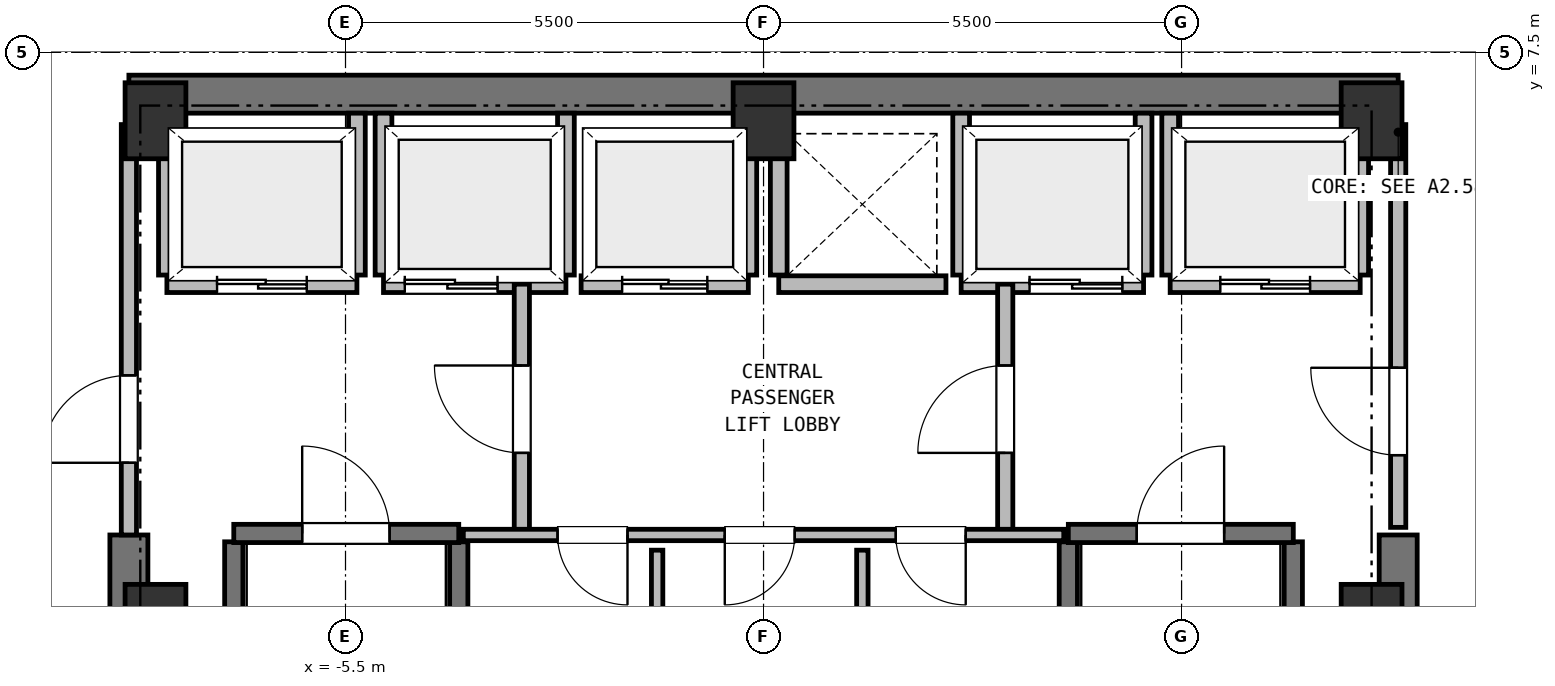
"""IFC4 building model, lengths in metres.
Left out: names, types, materials, properties, quantities, classifications, styles, units other than length and angle.
Written with IfcOpenShell. Run it as: python <this file> out.ifc"""

import sys

from ifc_helpers import new_model, si_unit, direction, frame, frame_2d, origin, origin_2d, place, context, subcontext, project, spatial, rectangle, extrude, element, fill, save


model = new_model("IFC4")
c1 = context("Model", 3, precision=1e-05, world=origin(), true_north=direction((0.0, 1.0)))
c2 = subcontext(c1, "Body", "Model", "MODEL_VIEW")
j1 = project(units=[si_unit("LENGTHUNIT", "METRE"), si_unit("PLANEANGLEUNIT", "RADIAN")], contexts=[c1])
p1 = place(None, origin())
s1 = spatial("IfcSite", under=j1, at=p1, CompositionType="ELEMENT")
p2 = place(p1, origin())
s2 = spatial("IfcBuilding", under=s1, at=p2, CompositionType="ELEMENT")
p3 = place(p2, frame((0.0, 0.0, 216.95)))
s3 = spatial("IfcBuildingStorey", under=s2, at=p3, CompositionType="ELEMENT", Elevation=216.95)
for number, where, z_axis, x_axis in (
    (1, (8.0, 0.0, 0.0), (0.0, 0.0, 1.0), (1.0, 0.0, 0.0)),
    (2, (8.0, 6.6, 0.0), (0.0, 0.0, 1.0), (1.0, 0.0, 0.0)),
    (3, (0.0, 6.6, 0.0), (0.0, 0.0, 1.0), (1.0, 0.0, 0.0)),
    (4, (-8.0, 6.6, 0.0), (0.0, 0.0, 1.0), (1.0, 0.0, 0.0)),
    (5, (-8.0, 0.0, 0.0), (0.0, 0.0, 1.0), (1.0, 0.0, 0.0)),
):
    element("IfcColumn", number, at=place(p3, frame(where, z_axis=z_axis, x_axis=x_axis)), inside=s3, PredefinedType="COLUMN", context=c2, shape_type="SweptSolid", body=[
        extrude(rectangle(XDim=0.8, YDim=1.0, at=origin_2d()), origin(), (0.0, 0.0, 1.0), 3.8),
    ])
p4 = place(p3, frame((-8.35, 6.95, 0.0), z_axis=(0.0, 0.0, 1.0), x_axis=(1.0, 0.0, 0.0)))
e6 = element("IfcWall", 6, at=p4, inside=s3, PredefinedType="SHEAR", context=c2, shape_type="SweptSolid", body=[
    extrude(rectangle(XDim=16.7, YDim=0.5, at=frame_2d((8.35, 0.0))), origin(), (0.0, 0.0, 1.0), 3.55),
])
for number, where, z_axis, x_axis in (
    (7, (-8.35, -6.95, 0.0), (0.0, 0.0, 1.0), (0.0, 1.0, 0.0)),
    (8, (8.35, -6.95, 0.0), (0.0, 0.0, 1.0), (0.0, 1.0, 0.0)),
):
    element("IfcWall", number, at=place(p3, frame(where, z_axis=z_axis, x_axis=x_axis)), inside=s3, PredefinedType="SHEAR", context=c2, shape_type="SweptSolid", body=[
        extrude(rectangle(XDim=8.1, YDim=0.5, at=frame_2d((4.05, 0.0))), origin(), (0.0, 0.0, 1.0), 3.55),
    ])
for number, where, z_axis, x_axis in (
    (9, (-6.97, -6.16, 0.0), (0.0, 0.0, 1.0), (0.0, 1.0, 0.0)),
    (10, (-4.01, -6.16, 0.0), (0.0, 0.0, 1.0), (0.0, 1.0, 0.0)),
):
    element("IfcWall", number, at=place(p3, frame(where, z_axis=z_axis, x_axis=x_axis)), inside=s3, PredefinedType="SHEAR", context=c2, shape_type="SweptSolid", body=[
        extrude(rectangle(XDim=7.22, YDim=0.24, at=frame_2d((3.61, 0.0))), origin(), (0.0, 0.0, 1.0), 3.55),
    ])
p5 = place(p3, frame((-6.97, 1.17, 0.0), z_axis=(0.0, 0.0, 1.0), x_axis=(1.0, 0.0, 0.0)))
e11 = element("IfcWall", 11, at=p5, inside=s3, PredefinedType="SHEAR", context=c2, shape_type="SweptSolid", body=[
    extrude(rectangle(XDim=2.96, YDim=0.24, at=frame_2d((1.48, 0.0))), origin(), (0.0, 0.0, 1.0), 3.55),
])
p6 = place(p5, frame((0.9, 0.0, 0.0)))
e12 = element("IfcOpeningElement", 12, at=p6, cuts=e11, PredefinedType="OPENING", context=c2, shape_type="SweptSolid", body=[
    extrude(rectangle(XDim=1.15, YDim=2.15, at=frame_2d((0.575, 1.075))), frame((0.0, 0.13, 0.0), z_axis=(0.0, -1.0, 0.0), x_axis=(1.0, 0.0, 0.0)), (0.0, 0.0, 1.0), 0.26),
])
for number, where, z_axis, x_axis in (
    (13, (4.01, -6.16, 0.0), (0.0, 0.0, 1.0), (0.0, 1.0, 0.0)),
    (14, (6.97, -6.16, 0.0), (0.0, 0.0, 1.0), (0.0, 1.0, 0.0)),
):
    element("IfcWall", number, at=place(p3, frame(where, z_axis=z_axis, x_axis=x_axis)), inside=s3, PredefinedType="SHEAR", context=c2, shape_type="SweptSolid", body=[
        extrude(rectangle(XDim=7.22, YDim=0.24, at=frame_2d((3.61, 0.0))), origin(), (0.0, 0.0, 1.0), 3.55),
    ])
p7 = place(p3, frame((4.01, 1.17, 0.0), z_axis=(0.0, 0.0, 1.0), x_axis=(1.0, 0.0, 0.0)))
e15 = element("IfcWall", 15, at=p7, inside=s3, PredefinedType="SHEAR", context=c2, shape_type="SweptSolid", body=[
    extrude(rectangle(XDim=2.96, YDim=0.24, at=frame_2d((1.48, 0.0))), origin(), (0.0, 0.0, 1.0), 3.55),
])
p8 = place(p7, frame((0.9, 0.0, 0.0)))
e16 = element("IfcOpeningElement", 16, at=p8, cuts=e15, PredefinedType="OPENING", context=c2, shape_type="SweptSolid", body=[
    extrude(rectangle(XDim=1.15, YDim=2.15, at=frame_2d((0.575, 1.075))), frame((0.0, 0.13, 0.0), z_axis=(0.0, -1.0, 0.0), x_axis=(1.0, 0.0, 0.0)), (0.0, 0.0, 1.0), 0.26),
])
p9 = place(p3, frame((-7.85, 4.45, 0.0), z_axis=(0.0, 0.0, 1.0), x_axis=(1.0, 0.0, 0.0)))
e17 = element("IfcWall", 17, at=p9, inside=s3, PredefinedType="PARTITIONING", context=c2, shape_type="SweptSolid", body=[
    extrude(rectangle(XDim=2.5, YDim=0.22, at=frame_2d((1.25, 0.0))), origin(), (0.0, 0.0, 1.0), 3.55),
])
p10 = place(p9, frame((0.66, 0.0, 0.0)))
e18 = element("IfcOpeningElement", 18, at=p10, cuts=e17, PredefinedType="OPENING", context=c2, shape_type="SweptSolid", body=[
    extrude(rectangle(XDim=1.18, YDim=2.15, at=frame_2d((0.59, 1.075))), frame((0.0, 0.12, 0.0), z_axis=(0.0, -1.0, 0.0), x_axis=(1.0, 0.0, 0.0)), (0.0, 0.0, 1.0), 0.24),
])
p11 = place(p3, frame((-7.85, 4.57, 0.0), z_axis=(0.0, 0.0, 1.0), x_axis=(0.0, 1.0, 0.0)))
e19 = element("IfcWall", 19, at=p11, inside=s3, PredefinedType="PARTITIONING", context=c2, shape_type="SweptSolid", body=[
    extrude(rectangle(XDim=2.13, YDim=0.22, at=frame_2d((1.065, 0.0))), origin(), (0.0, 0.0, 1.0), 3.18),
])
p12 = place(p3, frame((-5.35, 4.57, 0.0), z_axis=(0.0, 0.0, 1.0), x_axis=(0.0, 1.0, 0.0)))
e20 = element("IfcWall", 20, at=p12, inside=s3, PredefinedType="PARTITIONING", context=c2, shape_type="SweptSolid", body=[
    extrude(rectangle(XDim=2.13, YDim=0.22, at=frame_2d((1.065, 0.0))), origin(), (0.0, 0.0, 1.0), 3.55),
])
p13 = place(p3, frame((5.35, 4.45, 0.0), z_axis=(0.0, 0.0, 1.0), x_axis=(1.0, 0.0, 0.0)))
e21 = element("IfcWall", 21, at=p13, inside=s3, PredefinedType="PARTITIONING", context=c2, shape_type="SweptSolid", body=[
    extrude(rectangle(XDim=2.5, YDim=0.22, at=frame_2d((1.25, 0.0))), origin(), (0.0, 0.0, 1.0), 3.55),
])
p14 = place(p13, frame((0.66, 0.0, 0.0)))
e22 = element("IfcOpeningElement", 22, at=p14, cuts=e21, PredefinedType="OPENING", context=c2, shape_type="SweptSolid", body=[
    extrude(rectangle(XDim=1.18, YDim=2.15, at=frame_2d((0.59, 1.075))), frame((0.0, 0.12, 0.0), z_axis=(0.0, -1.0, 0.0), x_axis=(1.0, 0.0, 0.0)), (0.0, 0.0, 1.0), 0.24),
])
p15 = place(p3, frame((5.35, 4.57, 0.0), z_axis=(0.0, 0.0, 1.0), x_axis=(0.0, 1.0, 0.0)))
e23 = element("IfcWall", 23, at=p15, inside=s3, PredefinedType="PARTITIONING", context=c2, shape_type="SweptSolid", body=[
    extrude(rectangle(XDim=2.13, YDim=0.22, at=frame_2d((1.065, 0.0))), origin(), (0.0, 0.0, 1.0), 3.55),
])
p16 = place(p3, frame((7.85, 4.57, 0.0), z_axis=(0.0, 0.0, 1.0), x_axis=(0.0, 1.0, 0.0)))
e24 = element("IfcWall", 24, at=p16, inside=s3, PredefinedType="PARTITIONING", context=c2, shape_type="SweptSolid", body=[
    extrude(rectangle(XDim=2.13, YDim=0.22, at=frame_2d((1.065, 0.0))), origin(), (0.0, 0.0, 1.0), 3.18),
])
p17 = place(p3, frame((-5.0, 4.45, 0.0), z_axis=(0.0, 0.0, 1.0), x_axis=(1.0, 0.0, 0.0)))
e25 = element("IfcWall", 25, at=p17, inside=s3, PredefinedType="PARTITIONING", context=c2, shape_type="SweptSolid", body=[
    extrude(rectangle(XDim=2.4, YDim=0.22, at=frame_2d((1.2, 0.0))), origin(), (0.0, 0.0, 1.0), 3.55),
])
p18 = place(p17, frame((0.28, 0.0, 0.0)))
e26 = element("IfcOpeningElement", 26, at=p18, cuts=e25, PredefinedType="OPENING", context=c2, shape_type="SweptSolid", body=[
    extrude(rectangle(XDim=1.22, YDim=2.15, at=frame_2d((0.61, 1.075))), frame((0.0, 0.12, 0.0), z_axis=(0.0, -1.0, 0.0), x_axis=(1.0, 0.0, 0.0)), (0.0, 0.0, 1.0), 0.24),
])
for number, where, z_axis, x_axis in (
    (27, (-5.0, 4.57, 0.0), (0.0, 0.0, 1.0), (0.0, 1.0, 0.0)),
    (28, (-2.6, 4.57, 0.0), (0.0, 0.0, 1.0), (0.0, 1.0, 0.0)),
):
    element("IfcWall", number, at=place(p3, frame(where, z_axis=z_axis, x_axis=x_axis)), inside=s3, PredefinedType="PARTITIONING", context=c2, shape_type="SweptSolid", body=[
        extrude(rectangle(XDim=2.13, YDim=0.22, at=frame_2d((1.065, 0.0))), origin(), (0.0, 0.0, 1.0), 3.55),
    ])
p19 = place(p3, frame((2.6, 4.45, 0.0), z_axis=(0.0, 0.0, 1.0), x_axis=(1.0, 0.0, 0.0)))
e29 = element("IfcWall", 29, at=p19, inside=s3, PredefinedType="PARTITIONING", context=c2, shape_type="SweptSolid", body=[
    extrude(rectangle(XDim=2.4, YDim=0.22, at=frame_2d((1.2, 0.0))), origin(), (0.0, 0.0, 1.0), 3.55),
])
p20 = place(p19, frame((0.9, 0.0, 0.0)))
e30 = element("IfcOpeningElement", 30, at=p20, cuts=e29, PredefinedType="OPENING", context=c2, shape_type="SweptSolid", body=[
    extrude(rectangle(XDim=1.22, YDim=2.15, at=frame_2d((0.61, 1.075))), frame((0.0, 0.12, 0.0), z_axis=(0.0, -1.0, 0.0), x_axis=(1.0, 0.0, 0.0)), (0.0, 0.0, 1.0), 0.24),
])
for number, where, z_axis, x_axis in (
    (31, (2.6, 4.57, 0.0), (0.0, 0.0, 1.0), (0.0, 1.0, 0.0)),
    (32, (5.0, 4.57, 0.0), (0.0, 0.0, 1.0), (0.0, 1.0, 0.0)),
):
    element("IfcWall", number, at=place(p3, frame(where, z_axis=z_axis, x_axis=x_axis)), inside=s3, PredefinedType="PARTITIONING", context=c2, shape_type="SweptSolid", body=[
        extrude(rectangle(XDim=2.13, YDim=0.22, at=frame_2d((1.065, 0.0))), origin(), (0.0, 0.0, 1.0), 3.55),
    ])
p21 = place(p3, frame((-2.4, 4.45, 0.0), z_axis=(0.0, 0.0, 1.0), x_axis=(1.0, 0.0, 0.0)))
e33 = element("IfcWall", 33, at=p21, inside=s3, PredefinedType="PARTITIONING", context=c2, shape_type="SweptSolid", body=[
    extrude(rectangle(XDim=2.2, YDim=0.22, at=frame_2d((1.1, 0.0))), origin(), (0.0, 0.0, 1.0), 3.55),
])
p22 = place(p21, frame((0.54, 0.0, 0.0)))
e34 = element("IfcOpeningElement", 34, at=p22, cuts=e33, PredefinedType="OPENING", context=c2, shape_type="SweptSolid", body=[
    extrude(rectangle(XDim=1.12, YDim=2.15, at=frame_2d((0.56, 1.075))), frame((0.0, 0.12, 0.0), z_axis=(0.0, -1.0, 0.0), x_axis=(1.0, 0.0, 0.0)), (0.0, 0.0, 1.0), 0.24),
])
p23 = place(p3, frame((-0.2, 4.57, 0.0), z_axis=(0.0, 0.0, 1.0), x_axis=(0.0, 1.0, 0.0)))
e35 = element("IfcWall", 35, at=p23, inside=s3, PredefinedType="PARTITIONING", context=c2, shape_type="SweptSolid", body=[
    extrude(rectangle(XDim=2.13, YDim=0.22, at=frame_2d((1.065, 0.0))), origin(), (0.0, 0.0, 1.0), 3.55),
])
p24 = place(p3, frame((0.2, 4.45, 0.0), z_axis=(0.0, 0.0, 1.0), x_axis=(1.0, 0.0, 0.0)))
e36 = element("IfcWall", 36, at=p24, inside=s3, PredefinedType="PARTITIONING", context=c2, shape_type="SweptSolid", body=[
    extrude(rectangle(XDim=2.2, YDim=0.22, at=frame_2d((1.1, 0.0))), origin(), (0.0, 0.0, 1.0), 3.55),
])
p25 = place(p3, frame((0.2, 4.57, 0.0), z_axis=(0.0, 0.0, 1.0), x_axis=(0.0, 1.0, 0.0)))
e37 = element("IfcWall", 37, at=p25, inside=s3, PredefinedType="PARTITIONING", context=c2, shape_type="SweptSolid", body=[
    extrude(rectangle(XDim=2.13, YDim=0.22, at=frame_2d((1.065, 0.0))), origin(), (0.0, 0.0, 1.0), 3.55),
])
p26 = place(p3, frame((-3.18, 1.15, 0.0), z_axis=(0.0, 0.0, 1.0), x_axis=(0.0, 1.0, 0.0)))
e38 = element("IfcWall", 38, at=p26, inside=s3, PredefinedType="PARTITIONING", context=c2, shape_type="SweptSolid", body=[
    extrude(rectangle(XDim=3.3, YDim=0.2, at=frame_2d((1.65, 0.0))), origin(), (0.0, 0.0, 1.0), 3.55),
])
p27 = place(p26, frame((1.08, 0.0, 0.0)))
e39 = element("IfcOpeningElement", 39, at=p27, cuts=e38, PredefinedType="OPENING", context=c2, shape_type="SweptSolid", body=[
    extrude(rectangle(XDim=1.15, YDim=2.15, at=frame_2d((0.575, 1.075))), frame((0.0, 0.11, 0.0), z_axis=(0.0, -1.0, 0.0), x_axis=(1.0, 0.0, 0.0)), (0.0, 0.0, 1.0), 0.22),
])
p28 = place(p3, frame((3.18, 1.15, 0.0), z_axis=(0.0, 0.0, 1.0), x_axis=(0.0, 1.0, 0.0)))
e40 = element("IfcWall", 40, at=p28, inside=s3, PredefinedType="PARTITIONING", context=c2, shape_type="SweptSolid", body=[
    extrude(rectangle(XDim=3.3, YDim=0.2, at=frame_2d((1.65, 0.0))), origin(), (0.0, 0.0, 1.0), 3.55),
])
p29 = place(p28, frame((1.08, 0.0, 0.0)))
e41 = element("IfcOpeningElement", 41, at=p29, cuts=e40, PredefinedType="OPENING", context=c2, shape_type="SweptSolid", body=[
    extrude(rectangle(XDim=1.15, YDim=2.15, at=frame_2d((0.575, 1.075))), frame((0.0, 0.11, 0.0), z_axis=(0.0, -1.0, 0.0), x_axis=(1.0, 0.0, 0.0)), (0.0, 0.0, 1.0), 0.22),
])
p30 = place(p3, frame((-8.35, 1.15, 0.0), z_axis=(0.0, 0.0, 1.0), x_axis=(0.0, 1.0, 0.0)))
e42 = element("IfcWall", 42, at=p30, inside=s3, PredefinedType="PARTITIONING", context=c2, shape_type="SweptSolid", body=[
    extrude(rectangle(XDim=5.4, YDim=0.2, at=frame_2d((2.7, 0.0))), origin(), (0.0, 0.0, 1.0), 3.55),
])
p31 = place(p30, frame((0.95, 0.0, 0.0)))
e43 = element("IfcOpeningElement", 43, at=p31, cuts=e42, PredefinedType="OPENING", context=c2, shape_type="SweptSolid", body=[
    extrude(rectangle(XDim=1.15, YDim=2.15, at=frame_2d((0.575, 1.075))), frame((0.0, 0.11, 0.0), z_axis=(0.0, -1.0, 0.0), x_axis=(1.0, 0.0, 0.0)), (0.0, 0.0, 1.0), 0.22),
])
p32 = place(p3, frame((8.35, 1.25, 0.0), z_axis=(0.0, 0.0, 1.0), x_axis=(0.0, 1.0, 0.0)))
e44 = element("IfcWall", 44, at=p32, inside=s3, PredefinedType="PARTITIONING", context=c2, shape_type="SweptSolid", body=[
    extrude(rectangle(XDim=5.3, YDim=0.2, at=frame_2d((2.65, 0.0))), origin(), (0.0, 0.0, 1.0), 3.55),
])
p33 = place(p32, frame((0.95, 0.0, 0.0)))
e45 = element("IfcOpeningElement", 45, at=p33, cuts=e44, PredefinedType="OPENING", context=c2, shape_type="SweptSolid", body=[
    extrude(rectangle(XDim=1.15, YDim=2.15, at=frame_2d((0.575, 1.075))), frame((0.0, 0.11, 0.0), z_axis=(0.0, -1.0, 0.0), x_axis=(1.0, 0.0, 0.0)), (0.0, 0.0, 1.0), 0.22),
])
p34 = place(p3, frame((3.95, 1.15, 0.0), z_axis=(0.0, 0.0, 1.0), x_axis=(-1.0, 0.0, 0.0)))
e46 = element("IfcWall", 46, at=p34, inside=s3, PredefinedType="PARTITIONING", context=c2, shape_type="SweptSolid", body=[
    extrude(rectangle(XDim=7.9, YDim=0.15, at=frame_2d((3.95, 0.0))), origin(), (0.0, 0.0, 1.0), 3.55),
])
p35 = place(p34, frame((5.74, 0.0, 0.0)))
e47 = element("IfcOpeningElement", 47, at=p35, cuts=e46, PredefinedType="OPENING", context=c2, shape_type="SweptSolid", body=[
    extrude(rectangle(XDim=0.92, YDim=2.05, at=frame_2d((0.46, 1.025))), frame((0.0, 0.085, 0.0), z_axis=(0.0, -1.0, 0.0), x_axis=(1.0, 0.0, 0.0)), (0.0, 0.0, 1.0), 0.17),
])
p36 = place(p34, frame((3.54, 0.0, 0.0)))
e48 = element("IfcOpeningElement", 48, at=p36, cuts=e46, PredefinedType="OPENING", context=c2, shape_type="SweptSolid", body=[
    extrude(rectangle(XDim=0.92, YDim=2.05, at=frame_2d((0.46, 1.025))), frame((0.0, 0.085, 0.0), z_axis=(0.0, -1.0, 0.0), x_axis=(1.0, 0.0, 0.0)), (0.0, 0.0, 1.0), 0.17),
])
p37 = place(p34, frame((1.29, 0.0, 0.0)))
e49 = element("IfcOpeningElement", 49, at=p37, cuts=e46, PredefinedType="OPENING", context=c2, shape_type="SweptSolid", body=[
    extrude(rectangle(XDim=0.92, YDim=2.05, at=frame_2d((0.46, 1.025))), frame((0.0, 0.085, 0.0), z_axis=(0.0, -1.0, 0.0), x_axis=(1.0, 0.0, 0.0)), (0.0, 0.0, 1.0), 0.17),
])
for number, where, z_axis, x_axis in (
    (50, (-1.4, -6.58, 0.0), (0.0, 0.0, 1.0), (0.0, 1.0, 0.0)),
    (51, (1.3, -6.58, 0.0), (0.0, 0.0, 1.0), (0.0, 1.0, 0.0)),
):
    element("IfcWall", number, at=place(p3, frame(where, z_axis=z_axis, x_axis=x_axis)), inside=s3, PredefinedType="PARTITIONING", context=c2, shape_type="SweptSolid", body=[
        extrude(rectangle(XDim=7.53, YDim=0.15, at=frame_2d((3.765, 0.0))), origin(), (0.0, 0.0, 1.0), 3.55),
    ])
for number, where, z_axis, x_axis in (
    (52, (8.648, 9.171, 0.0), (0.0, 0.0, 1.0), (0.69, -0.724, 0.0)),
    (53, (-10.422, 7.309, 0.0), (0.0, 0.0, 1.0), (0.69, 0.724, 0.0)),
):
    element("IfcWall", number, at=place(p3, frame(where, z_axis=z_axis, x_axis=x_axis)), inside=s3, PredefinedType="PARTITIONING", context=c2, shape_type="SweptSolid", body=[
        extrude(rectangle(XDim=2.572, YDim=0.15, at=frame_2d((1.286, 0.0))), origin(), (0.0, 0.0, 1.0), 3.55),
    ])
p38 = place(p6, origin())
e54 = element("IfcDoor", 54, at=p38, inside=s3, OperationType="SINGLE_SWING_LEFT", PredefinedType="DOOR", context=c2, shape_type="SweptSolid", body=[
    extrude(rectangle(XDim=1.15, YDim=2.15, at=frame_2d((0.575, 1.075))), frame((0.0, 0.025, 0.0), z_axis=(0.0, -1.0, 0.0), x_axis=(1.0, 0.0, 0.0)), (0.0, 0.0, 1.0), 0.05),
])
fill(e12, e54)
p39 = place(p8, origin())
e55 = element("IfcDoor", 55, at=p39, inside=s3, OperationType="SINGLE_SWING_RIGHT", PredefinedType="DOOR", context=c2, shape_type="SweptSolid", body=[
    extrude(rectangle(XDim=1.15, YDim=2.15, at=frame_2d((0.575, 1.075))), frame((0.0, 0.025, 0.0), z_axis=(0.0, -1.0, 0.0), x_axis=(1.0, 0.0, 0.0)), (0.0, 0.0, 1.0), 0.05),
])
fill(e16, e55)
p40 = place(p10, origin())
e56 = element("IfcDoor", 56, at=p40, inside=s3, OperationType="DOUBLE_DOOR_SLIDING", PredefinedType="DOOR", context=c2, shape_type="SweptSolid", body=[
    extrude(rectangle(XDim=1.18, YDim=2.15, at=frame_2d((0.59, 1.075))), frame((0.0, 0.025, 0.0), z_axis=(0.0, -1.0, 0.0), x_axis=(1.0, 0.0, 0.0)), (0.0, 0.0, 1.0), 0.05),
])
fill(e18, e56)
p41 = place(p14, origin())
e57 = element("IfcDoor", 57, at=p41, inside=s3, OperationType="DOUBLE_DOOR_SLIDING", PredefinedType="DOOR", context=c2, shape_type="SweptSolid", body=[
    extrude(rectangle(XDim=1.18, YDim=2.15, at=frame_2d((0.59, 1.075))), frame((0.0, 0.025, 0.0), z_axis=(0.0, -1.0, 0.0), x_axis=(1.0, 0.0, 0.0)), (0.0, 0.0, 1.0), 0.05),
])
fill(e22, e57)
p42 = place(p18, origin())
e58 = element("IfcDoor", 58, at=p42, inside=s3, OperationType="DOUBLE_DOOR_SLIDING", PredefinedType="DOOR", context=c2, shape_type="SweptSolid", body=[
    extrude(rectangle(XDim=1.22, YDim=2.15, at=frame_2d((0.61, 1.075))), frame((0.0, 0.025, 0.0), z_axis=(0.0, -1.0, 0.0), x_axis=(1.0, 0.0, 0.0)), (0.0, 0.0, 1.0), 0.05),
])
fill(e26, e58)
p43 = place(p20, origin())
e59 = element("IfcDoor", 59, at=p43, inside=s3, OperationType="DOUBLE_DOOR_SLIDING", PredefinedType="DOOR", context=c2, shape_type="SweptSolid", body=[
    extrude(rectangle(XDim=1.22, YDim=2.15, at=frame_2d((0.61, 1.075))), frame((0.0, 0.025, 0.0), z_axis=(0.0, -1.0, 0.0), x_axis=(1.0, 0.0, 0.0)), (0.0, 0.0, 1.0), 0.05),
])
fill(e30, e59)
p44 = place(p22, origin())
e60 = element("IfcDoor", 60, at=p44, inside=s3, OperationType="DOUBLE_DOOR_SLIDING", PredefinedType="DOOR", context=c2, shape_type="SweptSolid", body=[
    extrude(rectangle(XDim=1.12, YDim=2.15, at=frame_2d((0.56, 1.075))), frame((0.0, 0.025, 0.0), z_axis=(0.0, -1.0, 0.0), x_axis=(1.0, 0.0, 0.0)), (0.0, 0.0, 1.0), 0.05),
])
fill(e34, e60)
p45 = place(p27, origin())
e61 = element("IfcDoor", 61, at=p45, inside=s3, OperationType="SINGLE_SWING_RIGHT", PredefinedType="DOOR", context=c2, shape_type="SweptSolid", body=[
    extrude(rectangle(XDim=1.15, YDim=2.15, at=frame_2d((0.575, 1.075))), frame((0.0, 0.025, 0.0), z_axis=(0.0, -1.0, 0.0), x_axis=(1.0, 0.0, 0.0)), (0.0, 0.0, 1.0), 0.05),
])
fill(e39, e61)
p46 = place(p29, origin())
e62 = element("IfcDoor", 62, at=p46, inside=s3, OperationType="SINGLE_SWING_LEFT", PredefinedType="DOOR", context=c2, shape_type="SweptSolid", body=[
    extrude(rectangle(XDim=1.15, YDim=2.15, at=frame_2d((0.575, 1.075))), frame((0.0, 0.025, 0.0), z_axis=(0.0, -1.0, 0.0), x_axis=(1.0, 0.0, 0.0)), (0.0, 0.0, 1.0), 0.05),
])
fill(e41, e62)
p47 = place(p31, origin())
e63 = element("IfcDoor", 63, at=p47, inside=s3, OperationType="SINGLE_SWING_LEFT", PredefinedType="DOOR", context=c2, shape_type="SweptSolid", body=[
    extrude(rectangle(XDim=1.15, YDim=2.15, at=frame_2d((0.575, 1.075))), frame((0.0, 0.025, 0.0), z_axis=(0.0, -1.0, 0.0), x_axis=(1.0, 0.0, 0.0)), (0.0, 0.0, 1.0), 0.05),
])
fill(e43, e63)
p48 = place(p33, origin())
e64 = element("IfcDoor", 64, at=p48, inside=s3, OperationType="SINGLE_SWING_RIGHT", PredefinedType="DOOR", context=c2, shape_type="SweptSolid", body=[
    extrude(rectangle(XDim=1.15, YDim=2.15, at=frame_2d((0.575, 1.075))), frame((0.0, 0.025, 0.0), z_axis=(0.0, -1.0, 0.0), x_axis=(1.0, 0.0, 0.0)), (0.0, 0.0, 1.0), 0.05),
])
fill(e45, e64)
p49 = place(p35, origin())
e65 = element("IfcDoor", 65, at=p49, inside=s3, OperationType="SINGLE_SWING_LEFT", PredefinedType="DOOR", context=c2, shape_type="SweptSolid", body=[
    extrude(rectangle(XDim=0.92, YDim=2.05, at=frame_2d((0.46, 1.025))), frame((0.0, 0.025, 0.0), z_axis=(0.0, -1.0, 0.0), x_axis=(1.0, 0.0, 0.0)), (0.0, 0.0, 1.0), 0.05),
])
fill(e47, e65)
p50 = place(p36, origin())
e66 = element("IfcDoor", 66, at=p50, inside=s3, OperationType="SINGLE_SWING_RIGHT", PredefinedType="DOOR", context=c2, shape_type="SweptSolid", body=[
    extrude(rectangle(XDim=0.92, YDim=2.05, at=frame_2d((0.46, 1.025))), frame((0.0, 0.025, 0.0), z_axis=(0.0, -1.0, 0.0), x_axis=(1.0, 0.0, 0.0)), (0.0, 0.0, 1.0), 0.05),
])
fill(e48, e66)
p51 = place(p37, origin())
e67 = element("IfcDoor", 67, at=p51, inside=s3, OperationType="SINGLE_SWING_LEFT", PredefinedType="DOOR", context=c2, shape_type="SweptSolid", body=[
    extrude(rectangle(XDim=0.92, YDim=2.05, at=frame_2d((0.46, 1.025))), frame((0.0, 0.025, 0.0), z_axis=(0.0, -1.0, 0.0), x_axis=(1.0, 0.0, 0.0)), (0.0, 0.0, 1.0), 0.05),
])
fill(e49, e67)
save(model, sys.argv[1])
